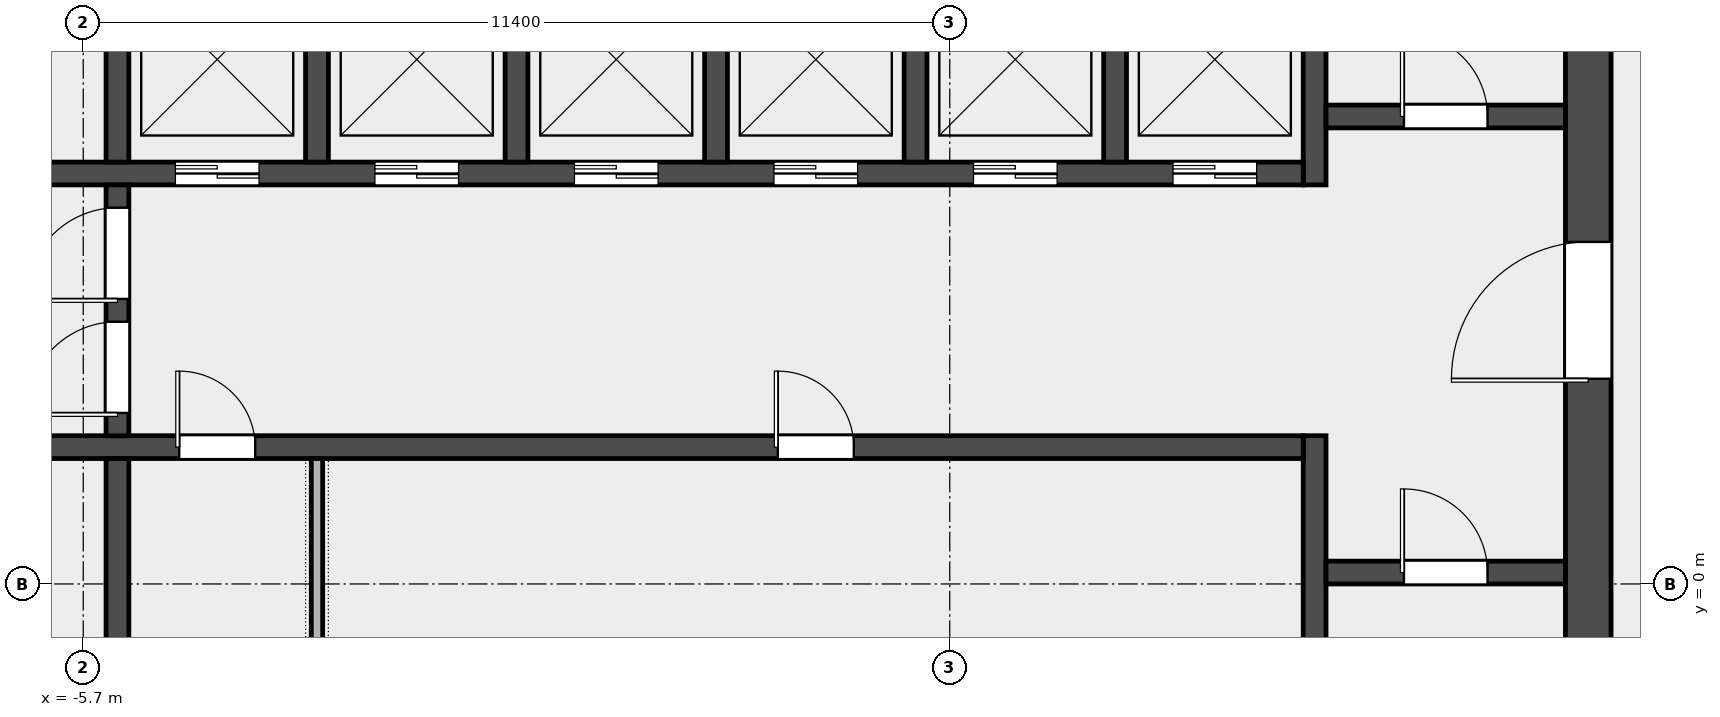
"""IFC4 building model, lengths in metres.
Left out: names, types, materials, properties, quantities, classifications, styles, units other than length and angle.
Written with IfcOpenShell. Run it as: python <this file> out.ifc"""

import sys

from ifc_helpers import new_model, si_unit, direction, frame, frame_2d, origin, place, context, subcontext, project, spatial, rectangle, extrude, element, fill, save


model = new_model("IFC4")
c1 = context("Model", 3, precision=1e-05, world=origin(), true_north=direction((0.0, 1.0)))
c2 = subcontext(c1, "Body", "Model", "MODEL_VIEW")
j1 = project(units=[si_unit("LENGTHUNIT", "METRE"), si_unit("PLANEANGLEUNIT", "RADIAN")], contexts=[c1])
p1 = place(None, origin())
s1 = spatial("IfcSite", under=j1, at=p1, CompositionType="ELEMENT")
p2 = place(p1, origin())
s2 = spatial("IfcBuilding", under=s1, at=p2, CompositionType="ELEMENT")
p3 = place(p2, frame((0.0, 0.0, 325.4)))
s3 = spatial("IfcBuildingStorey", under=s2, at=p3, CompositionType="ELEMENT", Elevation=325.4)
p4 = place(p3, frame((14.1, -6.6, 0.0), z_axis=(0.0, 0.0, 1.0), x_axis=(0.0, 1.0, 0.0)))
e1 = element("IfcWall", 1, at=p4, inside=s3, PredefinedType="SHEAR", context=c2, shape_type="SweptSolid", body=[
    extrude(rectangle(XDim=19.5, YDim=0.6, at=frame_2d((9.75, 0.0))), origin(), (0.0, 0.0, 1.0), 3.7),
])
p5 = place(p4, frame((9.3, 0.0, 0.0)))
e2 = element("IfcOpeningElement", 2, at=p5, cuts=e1, PredefinedType="OPENING", context=c2, shape_type="SweptSolid", body=[
    extrude(rectangle(XDim=1.8, YDim=2.1, at=frame_2d((0.9, 1.05))), frame((0.0, 0.312, 0.0), z_axis=(0.0, -1.0, 0.0), x_axis=(1.0, 0.0, 0.0)), (0.0, 0.0, 1.0), 0.624),
])
p6 = place(p3, frame((10.5, -6.6, 0.0), z_axis=(0.0, 0.0, 1.0), x_axis=(0.0, 1.0, 0.0)))
e3 = element("IfcWall", 3, at=p6, inside=s3, PredefinedType="SHEAR", context=c2, shape_type="SweptSolid", body=[
    extrude(rectangle(XDim=8.55, YDim=0.3, at=frame_2d((4.275, 0.0))), origin(), (0.0, 0.0, 1.0), 3.7),
])
p7 = place(p3, frame((10.5, 5.25, 0.0), z_axis=(0.0, 0.0, 1.0), x_axis=(0.0, 1.0, 0.0)))
e4 = element("IfcWall", 4, at=p7, inside=s3, PredefinedType="SHEAR", context=c2, shape_type="SweptSolid", body=[
    extrude(rectangle(XDim=7.65, YDim=0.3, at=frame_2d((3.825, 0.0))), origin(), (0.0, 0.0, 1.0), 3.7),
])
p8 = place(p3, frame((10.65, 0.15, 0.0), z_axis=(0.0, 0.0, 1.0), x_axis=(1.0, 0.0, 0.0)))
e5 = element("IfcWall", 5, at=p8, inside=s3, PredefinedType="SOLIDWALL", context=c2, shape_type="SweptSolid", body=[
    extrude(rectangle(XDim=3.15, YDim=0.3, at=frame_2d((1.575, 0.0))), origin(), (0.0, 0.0, 1.0), 3.7),
])
p9 = place(p8, frame((1.025, 0.0, 0.0)))
e6 = element("IfcOpeningElement", 6, at=p9, cuts=e5, PredefinedType="OPENING", context=c2, shape_type="SweptSolid", body=[
    extrude(rectangle(XDim=1.1, YDim=2.1, at=frame_2d((0.55, 1.05))), frame((0.0, 0.162, 0.0), z_axis=(0.0, -1.0, 0.0), x_axis=(1.0, 0.0, 0.0)), (0.0, 0.0, 1.0), 0.324),
])
p10 = place(p3, frame((10.65, 6.15, 0.0), z_axis=(0.0, 0.0, 1.0), x_axis=(1.0, 0.0, 0.0)))
e7 = element("IfcWall", 7, at=p10, inside=s3, PredefinedType="SOLIDWALL", context=c2, shape_type="SweptSolid", body=[
    extrude(rectangle(XDim=3.15, YDim=0.3, at=frame_2d((1.575, 0.0))), origin(), (0.0, 0.0, 1.0), 3.7),
])
p11 = place(p10, frame((1.025, 0.0, 0.0)))
e8 = element("IfcOpeningElement", 8, at=p11, cuts=e7, PredefinedType="OPENING", context=c2, shape_type="SweptSolid", body=[
    extrude(rectangle(XDim=1.1, YDim=2.1, at=frame_2d((0.55, 1.05))), frame((0.0, 0.162, 0.0), z_axis=(0.0, -1.0, 0.0), x_axis=(1.0, 0.0, 0.0)), (0.0, 0.0, 1.0), 0.324),
])
p12 = place(p3, frame((-10.35, 1.8, 0.0), z_axis=(0.0, 0.0, 1.0), x_axis=(1.0, 0.0, 0.0)))
e9 = element("IfcWall", 9, at=p12, inside=s3, PredefinedType="SOLIDWALL", context=c2, shape_type="SweptSolid", body=[
    extrude(rectangle(XDim=20.7, YDim=0.3, at=frame_2d((10.35, 0.0))), origin(), (0.0, 0.0, 1.0), 3.7),
])
p13 = place(p12, frame((0.512, 0.0, 0.0)))
e10 = element("IfcOpeningElement", 10, at=p13, cuts=e9, PredefinedType="OPENING", context=c2, shape_type="SweptSolid", body=[
    extrude(rectangle(XDim=1.3, YDim=2.1, at=frame_2d((0.65, 1.05))), frame((0.0, 0.162, 0.0), z_axis=(0.0, -1.0, 0.0), x_axis=(1.0, 0.0, 0.0)), (0.0, 0.0, 1.0), 0.324),
])
p14 = place(p12, frame((5.913, 0.0, 0.0)))
e11 = element("IfcOpeningElement", 11, at=p14, cuts=e9, PredefinedType="OPENING", context=c2, shape_type="SweptSolid", body=[
    extrude(rectangle(XDim=1.0, YDim=2.1, at=frame_2d((0.5, 1.05))), frame((0.0, 0.162, 0.0), z_axis=(0.0, -1.0, 0.0), x_axis=(1.0, 0.0, 0.0)), (0.0, 0.0, 1.0), 0.324),
])
p15 = place(p12, frame((13.788, 0.0, 0.0)))
e12 = element("IfcOpeningElement", 12, at=p15, cuts=e9, PredefinedType="OPENING", context=c2, shape_type="SweptSolid", body=[
    extrude(rectangle(XDim=1.0, YDim=2.1, at=frame_2d((0.5, 1.05))), frame((0.0, 0.162, 0.0), z_axis=(0.0, -1.0, 0.0), x_axis=(1.0, 0.0, 0.0)), (0.0, 0.0, 1.0), 0.324),
])
p16 = place(p3, frame((-10.35, 5.4, 0.0), z_axis=(0.0, 0.0, 1.0), x_axis=(1.0, 0.0, 0.0)))
e13 = element("IfcWall", 13, at=p16, inside=s3, PredefinedType="SOLIDWALL", context=c2, shape_type="SweptSolid", body=[
    extrude(rectangle(XDim=20.7, YDim=0.3, at=frame_2d((10.35, 0.0))), origin(), (0.0, 0.0, 1.0), 3.7),
])
p17 = place(p16, frame((0.512, 0.0, 0.0)))
e14 = element("IfcOpeningElement", 14, at=p17, cuts=e13, PredefinedType="OPENING", context=c2, shape_type="SweptSolid", body=[
    extrude(rectangle(XDim=1.3, YDim=2.1, at=frame_2d((0.65, 1.05))), frame((0.0, 0.162, 0.0), z_axis=(0.0, -1.0, 0.0), x_axis=(1.0, 0.0, 0.0)), (0.0, 0.0, 1.0), 0.324),
])
p18 = place(p16, frame((5.863, 0.0, 0.0)))
e15 = element("IfcOpeningElement", 15, at=p18, cuts=e13, PredefinedType="OPENING", context=c2, shape_type="SweptSolid", body=[
    extrude(rectangle(XDim=1.1, YDim=2.1, at=frame_2d((0.55, 1.05))), frame((0.0, 0.162, 0.0), z_axis=(0.0, -1.0, 0.0), x_axis=(1.0, 0.0, 0.0)), (0.0, 0.0, 1.0), 0.324),
])
p19 = place(p16, frame((8.488, 0.0, 0.0)))
e16 = element("IfcOpeningElement", 16, at=p19, cuts=e13, PredefinedType="OPENING", context=c2, shape_type="SweptSolid", body=[
    extrude(rectangle(XDim=1.1, YDim=2.1, at=frame_2d((0.55, 1.05))), frame((0.0, 0.162, 0.0), z_axis=(0.0, -1.0, 0.0), x_axis=(1.0, 0.0, 0.0)), (0.0, 0.0, 1.0), 0.324),
])
p20 = place(p16, frame((11.113, 0.0, 0.0)))
e17 = element("IfcOpeningElement", 17, at=p20, cuts=e13, PredefinedType="OPENING", context=c2, shape_type="SweptSolid", body=[
    extrude(rectangle(XDim=1.1, YDim=2.1, at=frame_2d((0.55, 1.05))), frame((0.0, 0.162, 0.0), z_axis=(0.0, -1.0, 0.0), x_axis=(1.0, 0.0, 0.0)), (0.0, 0.0, 1.0), 0.324),
])
p21 = place(p16, frame((13.738, 0.0, 0.0)))
e18 = element("IfcOpeningElement", 18, at=p21, cuts=e13, PredefinedType="OPENING", context=c2, shape_type="SweptSolid", body=[
    extrude(rectangle(XDim=1.1, YDim=2.1, at=frame_2d((0.55, 1.05))), frame((0.0, 0.162, 0.0), z_axis=(0.0, -1.0, 0.0), x_axis=(1.0, 0.0, 0.0)), (0.0, 0.0, 1.0), 0.324),
])
p22 = place(p16, frame((16.363, 0.0, 0.0)))
e19 = element("IfcOpeningElement", 19, at=p22, cuts=e13, PredefinedType="OPENING", context=c2, shape_type="SweptSolid", body=[
    extrude(rectangle(XDim=1.1, YDim=2.1, at=frame_2d((0.55, 1.05))), frame((0.0, 0.162, 0.0), z_axis=(0.0, -1.0, 0.0), x_axis=(1.0, 0.0, 0.0)), (0.0, 0.0, 1.0), 0.324),
])
p23 = place(p16, frame((18.988, 0.0, 0.0)))
e20 = element("IfcOpeningElement", 20, at=p23, cuts=e13, PredefinedType="OPENING", context=c2, shape_type="SweptSolid", body=[
    extrude(rectangle(XDim=1.1, YDim=2.1, at=frame_2d((0.55, 1.05))), frame((0.0, 0.162, 0.0), z_axis=(0.0, -1.0, 0.0), x_axis=(1.0, 0.0, 0.0)), (0.0, 0.0, 1.0), 0.324),
])
for number, where, z_axis, x_axis in (
    (21, (-5.25, -1.05, 0.0), (0.0, 0.0, 1.0), (0.0, 1.0, 0.0)),
    (22, (-5.25, 5.55, 0.0), (0.0, 0.0, 1.0), (0.0, 1.0, 0.0)),
    (23, (-2.625, 5.55, 0.0), (0.0, 0.0, 1.0), (0.0, 1.0, 0.0)),
    (24, (0.0, 5.55, 0.0), (0.0, 0.0, 1.0), (0.0, 1.0, 0.0)),
    (25, (2.625, 5.55, 0.0), (0.0, 0.0, 1.0), (0.0, 1.0, 0.0)),
    (26, (5.25, 5.55, 0.0), (0.0, 0.0, 1.0), (0.0, 1.0, 0.0)),
    (27, (7.875, 5.55, 0.0), (0.0, 0.0, 1.0), (0.0, 1.0, 0.0)),
):
    element("IfcWall", number, at=place(p3, frame(where, z_axis=z_axis, x_axis=x_axis)), inside=s3, PredefinedType="SOLIDWALL", context=c2, shape_type="SweptSolid", body=[
        extrude(rectangle(XDim=2.7, YDim=0.3, at=frame_2d((1.35, 0.0))), origin(), (0.0, 0.0, 1.0), 3.7),
    ])
p24 = place(p3, frame((-5.25, 1.95, 0.0), z_axis=(0.0, 0.0, 1.0), x_axis=(0.0, 1.0, 0.0)))
e28 = element("IfcWall", 28, at=p24, inside=s3, PredefinedType="SOLIDWALL", context=c2, shape_type="SweptSolid", body=[
    extrude(rectangle(XDim=3.3, YDim=0.3, at=frame_2d((1.65, 0.0))), origin(), (0.0, 0.0, 1.0), 3.7),
])
p25 = place(p24, frame((0.3, 0.0, 0.0)))
e29 = element("IfcOpeningElement", 29, at=p25, cuts=e28, PredefinedType="OPENING", context=c2, shape_type="SweptSolid", body=[
    extrude(rectangle(XDim=1.2, YDim=2.1, at=frame_2d((0.6, 1.05))), frame((0.0, 0.162, 0.0), z_axis=(0.0, -1.0, 0.0), x_axis=(1.0, 0.0, 0.0)), (0.0, 0.0, 1.0), 0.324),
])
p26 = place(p24, frame((1.8, 0.0, 0.0)))
e30 = element("IfcOpeningElement", 30, at=p26, cuts=e28, PredefinedType="OPENING", context=c2, shape_type="SweptSolid", body=[
    extrude(rectangle(XDim=1.2, YDim=2.1, at=frame_2d((0.6, 1.05))), frame((0.0, 0.162, 0.0), z_axis=(0.0, -1.0, 0.0), x_axis=(1.0, 0.0, 0.0)), (0.0, 0.0, 1.0), 0.324),
])
p27 = place(p3, frame((-2.625, -1.05, 0.0), z_axis=(0.0, 0.0, 1.0), x_axis=(0.0, 1.0, 0.0)))
e31 = element("IfcWall", 31, at=p27, inside=s3, PredefinedType="PARTITIONING", context=c2, shape_type="SweptSolid", body=[
    extrude(rectangle(XDim=2.7, YDim=0.15, at=frame_2d((1.35, 0.0))), origin(), (0.0, 0.0, 1.0), 3.7),
])
p28 = place(p9, origin())
e32 = element("IfcDoor", 32, at=p28, inside=s3, OperationType="SINGLE_SWING_RIGHT", PredefinedType="DOOR", context=c2, shape_type="SweptSolid", body=[
    extrude(rectangle(XDim=1.1, YDim=2.1, at=frame_2d((0.55, 1.05))), frame((0.0, 0.025, 0.0), z_axis=(0.0, -1.0, 0.0), x_axis=(1.0, 0.0, 0.0)), (0.0, 0.0, 1.0), 0.05),
])
fill(e6, e32)
p29 = place(p11, origin())
e33 = element("IfcDoor", 33, at=p29, inside=s3, OperationType="SINGLE_SWING_RIGHT", PredefinedType="DOOR", context=c2, shape_type="SweptSolid", body=[
    extrude(rectangle(XDim=1.1, YDim=2.1, at=frame_2d((0.55, 1.05))), frame((0.0, 0.025, 0.0), z_axis=(0.0, -1.0, 0.0), x_axis=(1.0, 0.0, 0.0)), (0.0, 0.0, 1.0), 0.05),
])
fill(e8, e33)
p30 = place(p5, origin())
e34 = element("IfcDoor", 34, at=p30, inside=s3, OperationType="DOUBLE_DOOR_SINGLE_SWING", PredefinedType="DOOR", context=c2, shape_type="SweptSolid", body=[
    extrude(rectangle(XDim=1.8, YDim=2.1, at=frame_2d((0.9, 1.05))), frame((0.0, 0.025, 0.0), z_axis=(0.0, -1.0, 0.0), x_axis=(1.0, 0.0, 0.0)), (0.0, 0.0, 1.0), 0.05),
])
fill(e2, e34)
p31 = place(p25, origin())
e35 = element("IfcDoor", 35, at=p31, inside=s3, OperationType="SINGLE_SWING_LEFT", PredefinedType="DOOR", context=c2, shape_type="SweptSolid", body=[
    extrude(rectangle(XDim=1.2, YDim=2.1, at=frame_2d((0.6, 1.05))), frame((0.0, 0.025, 0.0), z_axis=(0.0, -1.0, 0.0), x_axis=(1.0, 0.0, 0.0)), (0.0, 0.0, 1.0), 0.05),
])
fill(e29, e35)
p32 = place(p26, origin())
e36 = element("IfcDoor", 36, at=p32, inside=s3, OperationType="SINGLE_SWING_RIGHT", PredefinedType="DOOR", context=c2, shape_type="SweptSolid", body=[
    extrude(rectangle(XDim=1.2, YDim=2.1, at=frame_2d((0.6, 1.05))), frame((0.0, 0.025, 0.0), z_axis=(0.0, -1.0, 0.0), x_axis=(1.0, 0.0, 0.0)), (0.0, 0.0, 1.0), 0.05),
])
fill(e30, e36)
p33 = place(p18, origin())
e37 = element("IfcDoor", 37, at=p33, inside=s3, OperationType="DOUBLE_DOOR_SLIDING", PredefinedType="DOOR", context=c2, shape_type="SweptSolid", body=[
    extrude(rectangle(XDim=1.1, YDim=2.1, at=frame_2d((0.55, 1.05))), frame((0.0, 0.025, 0.0), z_axis=(0.0, -1.0, 0.0), x_axis=(1.0, 0.0, 0.0)), (0.0, 0.0, 1.0), 0.05),
])
fill(e15, e37)
p34 = place(p19, origin())
e38 = element("IfcDoor", 38, at=p34, inside=s3, OperationType="DOUBLE_DOOR_SLIDING", PredefinedType="DOOR", context=c2, shape_type="SweptSolid", body=[
    extrude(rectangle(XDim=1.1, YDim=2.1, at=frame_2d((0.55, 1.05))), frame((0.0, 0.025, 0.0), z_axis=(0.0, -1.0, 0.0), x_axis=(1.0, 0.0, 0.0)), (0.0, 0.0, 1.0), 0.05),
])
fill(e16, e38)
p35 = place(p20, origin())
e39 = element("IfcDoor", 39, at=p35, inside=s3, OperationType="DOUBLE_DOOR_SLIDING", PredefinedType="DOOR", context=c2, shape_type="SweptSolid", body=[
    extrude(rectangle(XDim=1.1, YDim=2.1, at=frame_2d((0.55, 1.05))), frame((0.0, 0.025, 0.0), z_axis=(0.0, -1.0, 0.0), x_axis=(1.0, 0.0, 0.0)), (0.0, 0.0, 1.0), 0.05),
])
fill(e17, e39)
p36 = place(p21, origin())
e40 = element("IfcDoor", 40, at=p36, inside=s3, OperationType="DOUBLE_DOOR_SLIDING", PredefinedType="DOOR", context=c2, shape_type="SweptSolid", body=[
    extrude(rectangle(XDim=1.1, YDim=2.1, at=frame_2d((0.55, 1.05))), frame((0.0, 0.025, 0.0), z_axis=(0.0, -1.0, 0.0), x_axis=(1.0, 0.0, 0.0)), (0.0, 0.0, 1.0), 0.05),
])
fill(e18, e40)
p37 = place(p22, origin())
e41 = element("IfcDoor", 41, at=p37, inside=s3, OperationType="DOUBLE_DOOR_SLIDING", PredefinedType="DOOR", context=c2, shape_type="SweptSolid", body=[
    extrude(rectangle(XDim=1.1, YDim=2.1, at=frame_2d((0.55, 1.05))), frame((0.0, 0.025, 0.0), z_axis=(0.0, -1.0, 0.0), x_axis=(1.0, 0.0, 0.0)), (0.0, 0.0, 1.0), 0.05),
])
fill(e19, e41)
p38 = place(p23, origin())
e42 = element("IfcDoor", 42, at=p38, inside=s3, OperationType="DOUBLE_DOOR_SLIDING", PredefinedType="DOOR", context=c2, shape_type="SweptSolid", body=[
    extrude(rectangle(XDim=1.1, YDim=2.1, at=frame_2d((0.55, 1.05))), frame((0.0, 0.025, 0.0), z_axis=(0.0, -1.0, 0.0), x_axis=(1.0, 0.0, 0.0)), (0.0, 0.0, 1.0), 0.05),
])
fill(e20, e42)
p39 = place(p14, origin())
e43 = element("IfcDoor", 43, at=p39, inside=s3, OperationType="SINGLE_SWING_LEFT", PredefinedType="DOOR", context=c2, shape_type="SweptSolid", body=[
    extrude(rectangle(XDim=1.0, YDim=2.1, at=frame_2d((0.5, 1.05))), frame((0.0, 0.025, 0.0), z_axis=(0.0, -1.0, 0.0), x_axis=(1.0, 0.0, 0.0)), (0.0, 0.0, 1.0), 0.05),
])
fill(e11, e43)
p40 = place(p15, origin())
e44 = element("IfcDoor", 44, at=p40, inside=s3, OperationType="SINGLE_SWING_LEFT", PredefinedType="DOOR", context=c2, shape_type="SweptSolid", body=[
    extrude(rectangle(XDim=1.0, YDim=2.1, at=frame_2d((0.5, 1.05))), frame((0.0, 0.025, 0.0), z_axis=(0.0, -1.0, 0.0), x_axis=(1.0, 0.0, 0.0)), (0.0, 0.0, 1.0), 0.05),
])
fill(e12, e44)
save(model, sys.argv[1])
